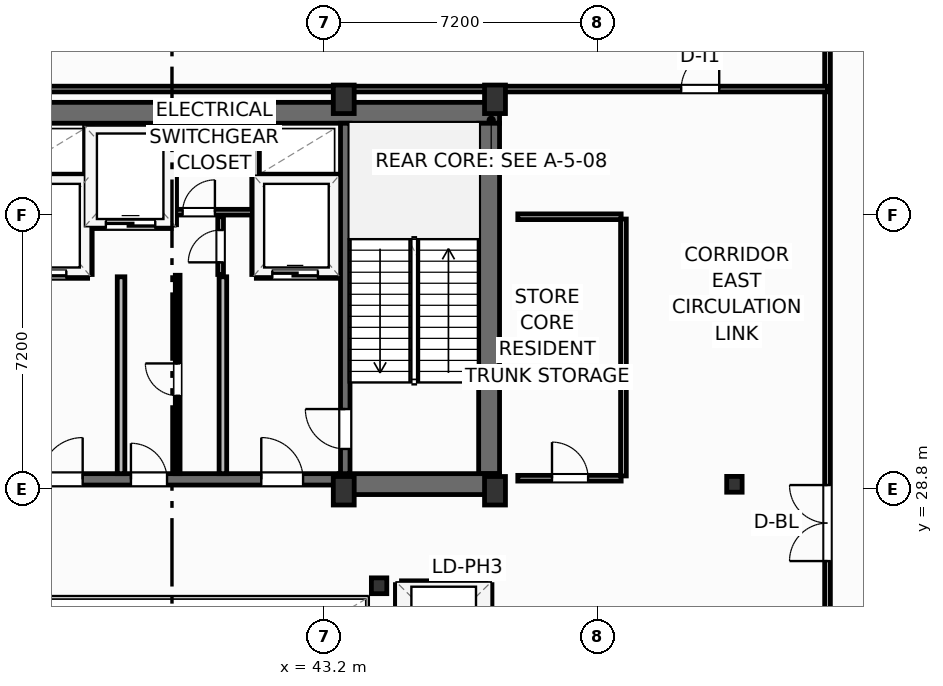
"""IFC4 building model, lengths in metres.
Left out: names, types, materials, properties, quantities, classifications, styles, units other than length and angle.
Written with IfcOpenShell. Run it as: python <this file> out.ifc"""

import sys

from ifc_helpers import new_model, si_unit, direction, frame, frame_2d, origin, origin_2d, place, context, subcontext, project, spatial, rectangle, i_section, extrude, element, fill, save


model = new_model("IFC4")
c1 = context("Model", 3, precision=1e-05, world=origin(), true_north=direction((0.0, 1.0)))
c2 = subcontext(c1, "Body", "Model", "MODEL_VIEW")
j1 = project(units=[si_unit("LENGTHUNIT", "METRE"), si_unit("PLANEANGLEUNIT", "RADIAN")], contexts=[c1])
p1 = place(None, origin())
s1 = spatial("IfcSite", under=j1, at=p1, CompositionType="ELEMENT")
p2 = place(p1, origin())
s2 = spatial("IfcBuilding", under=s1, at=p2, CompositionType="ELEMENT")
p3 = place(p2, frame((0.0, 0.0, 291.5)))
s3 = spatial("IfcBuildingStorey", under=s2, at=p3, CompositionType="ELEMENT", Elevation=291.5)
for number, where, z_axis, x_axis in (
    (1, (43.72, 28.75, 0.0), (0.0, 0.0, 1.0), (1.0, 0.0, 0.0)),
    (2, (47.7, 28.75, 0.0), (0.0, 0.0, 1.0), (1.0, 0.0, 0.0)),
    (3, (43.72, 39.05, 0.0), (0.0, 0.0, 1.0), (1.0, 0.0, 0.0)),
    (4, (47.7, 39.05, 0.0), (0.0, 0.0, 1.0), (1.0, 0.0, 0.0)),
):
    element("IfcColumn", number, at=place(p3, frame(where, z_axis=z_axis, x_axis=x_axis)), inside=s3, PredefinedType="COLUMN", context=c2, shape_type="SweptSolid", body=[
        extrude(rectangle(XDim=0.55, YDim=0.75, at=origin_2d()), origin(), (0.0, 0.0, 1.0), 4.8),
    ])
for number, where, z_axis, x_axis in (
    (5, (44.65, 26.25, 0.0), (0.0, 0.0, 1.0), (1.0, 0.0, 0.0)),
    (6, (54.0, 28.92, 0.0), (0.0, 0.0, 1.0), (1.0, 0.0, 0.0)),
):
    element("IfcColumn", number, at=place(p3, frame(where, z_axis=z_axis, x_axis=x_axis)), inside=s3, PredefinedType="COLUMN", context=c2, shape_type="SweptSolid", body=[
        extrude(i_section(OverallWidth=0.406, OverallDepth=0.416, WebThickness=0.03, FlangeThickness=0.048, FilletRadius=0.025, at=origin_2d()), origin(), (0.0, 0.0, 1.0), 4.8),
    ])
p4 = place(p3, frame((30.58, 38.695, 0.0), z_axis=(0.0, 0.0, 1.0), x_axis=(1.0, 0.0, 0.0)))
e7 = element("IfcWall", 7, at=p4, inside=s3, PredefinedType="SHEAR", context=c2, shape_type="SweptSolid", body=[
    extrude(rectangle(XDim=17.24, YDim=0.55, at=frame_2d((8.62, 0.0))), origin(), (0.0, 0.0, 1.0), 4.48),
])
p5 = place(p3, frame((47.545, 29.2, 0.0), z_axis=(0.0, 0.0, 1.0), x_axis=(0.0, 1.0, 0.0)))
e8 = element("IfcWall", 8, at=p5, inside=s3, PredefinedType="SHEAR", context=c2, shape_type="SweptSolid", body=[
    extrude(rectangle(XDim=9.22, YDim=0.55, at=frame_2d((4.61, 0.0))), origin(), (0.0, 0.0, 1.0), 4.48),
])
p6 = place(p3, frame((43.6, 28.925, 0.0), z_axis=(0.0, 0.0, 1.0), x_axis=(1.0, 0.0, 0.0)))
e9 = element("IfcWall", 9, at=p6, inside=s3, PredefinedType="SHEAR", context=c2, shape_type="SweptSolid", body=[
    extrude(rectangle(XDim=4.22, YDim=0.55, at=frame_2d((2.11, 0.0))), origin(), (0.0, 0.0, 1.0), 4.48),
])
p7 = place(p3, frame((34.8, 29.05, 0.0), z_axis=(0.0, 0.0, 1.0), x_axis=(1.0, 0.0, 0.0)))
e10 = element("IfcWall", 10, at=p7, inside=s3, PredefinedType="SHEAR", context=c2, shape_type="SweptSolid", body=[
    extrude(rectangle(XDim=8.8, YDim=0.3, at=frame_2d((4.4, 0.0))), origin(), (0.0, 0.0, 1.0), 4.48),
])
p8 = place(p7, frame((0.95, 0.0, 0.0)))
e11 = element("IfcOpeningElement", 11, at=p8, cuts=e10, PredefinedType="OPENING", context=c2, shape_type="SweptSolid", body=[
    extrude(rectangle(XDim=1.1, YDim=2.15, at=frame_2d((0.55, 1.075))), frame((0.0, 0.16, 0.0), z_axis=(0.0, -1.0, 0.0), x_axis=(1.0, 0.0, 0.0)), (0.0, 0.0, 1.0), 0.32),
])
p9 = place(p7, frame((6.75, 0.0, 0.0)))
e12 = element("IfcOpeningElement", 12, at=p9, cuts=e10, PredefinedType="OPENING", context=c2, shape_type="SweptSolid", body=[
    extrude(rectangle(XDim=1.1, YDim=2.15, at=frame_2d((0.55, 1.075))), frame((0.0, 0.16, 0.0), z_axis=(0.0, -1.0, 0.0), x_axis=(1.0, 0.0, 0.0)), (0.0, 0.0, 1.0), 0.32),
])
p10 = place(p7, frame((3.32, 0.0, 0.0)))
e13 = element("IfcOpeningElement", 13, at=p10, cuts=e10, PredefinedType="OPENING", context=c2, shape_type="SweptSolid", body=[
    extrude(rectangle(XDim=0.95, YDim=2.15, at=frame_2d((0.475, 1.075))), frame((0.0, 0.16, 0.0), z_axis=(0.0, -1.0, 0.0), x_axis=(1.0, 0.0, 0.0)), (0.0, 0.0, 1.0), 0.32),
])
p11 = place(p3, frame((43.76, 29.2, 0.0), z_axis=(0.0, 0.0, 1.0), x_axis=(0.0, 1.0, 0.0)))
e14 = element("IfcWall", 14, at=p11, inside=s3, PredefinedType="SHEAR", context=c2, shape_type="SweptSolid", body=[
    extrude(rectangle(XDim=9.22, YDim=0.25, at=frame_2d((4.61, 0.0))), origin(), (0.0, 0.0, 1.0), 4.48),
])
p12 = place(p11, frame((0.65, 0.0, 0.0)))
e15 = element("IfcOpeningElement", 15, at=p12, cuts=e14, PredefinedType="OPENING", context=c2, shape_type="SweptSolid", body=[
    extrude(rectangle(XDim=1.05, YDim=2.15, at=frame_2d((0.525, 1.075))), frame((0.0, 0.135, 0.0), z_axis=(0.0, -1.0, 0.0), x_axis=(1.0, 0.0, 0.0)), (0.0, 0.0, 1.0), 0.27),
])
p13 = place(p3, frame((27.693, -7.489, 0.0), z_axis=(0.0, 0.0, 1.0), x_axis=(0.733009701217, 0.680218184057, 0.0)))
e16 = element("IfcWall", 16, at=p13, inside=s3, PredefinedType="SOLIDWALL", context=c2, shape_type="SweptSolid", body=[
    extrude(rectangle(XDim=66.428, YDim=0.22, at=frame_2d((33.214, 0.0))), origin(), (0.0, 0.0, 1.0), 2.265),
])
p14 = place(p13, frame((32.014, 0.0, 0.8)))
e17 = element("IfcOpeningElement", 17, at=p14, cuts=e16, PredefinedType="OPENING", context=c2, shape_type="SweptSolid", body=[
    extrude(rectangle(XDim=2.4, YDim=1.385, at=frame_2d((1.2, 0.692))), frame((0.0, 0.12, 0.0), z_axis=(0.0, -1.0, 0.0), x_axis=(1.0, 0.0, 0.0)), (0.0, 0.0, 1.0), 0.24),
])
p15 = place(p3, frame((50.695, 58.086, 0.0), z_axis=(0.0, 0.0, 1.0), x_axis=(-0.823531024939, -0.567271232272, 0.0)))
e18 = element("IfcWall", 18, at=p15, inside=s3, PredefinedType="SOLIDWALL", context=c2, shape_type="SweptSolid", body=[
    extrude(rectangle(XDim=56.157, YDim=0.22, at=frame_2d((28.079, 0.0))), origin(), (0.0, 0.0, 1.0), 3.76),
])
p16 = place(p15, frame((26.879, 0.0, 0.8)))
e19 = element("IfcOpeningElement", 19, at=p16, cuts=e18, PredefinedType="OPENING", context=c2, shape_type="SweptSolid", body=[
    extrude(rectangle(XDim=2.4, YDim=1.85, at=frame_2d((1.2, 0.925))), frame((0.0, 0.12, 0.0), z_axis=(0.0, -1.0, 0.0), x_axis=(1.0, 0.0, 0.0)), (0.0, 0.0, 1.0), 0.24),
])
p17 = place(p3, frame((56.45, 19.3, 0.0), z_axis=(0.0, 0.0, 1.0), x_axis=(0.0, 1.0, 0.0)))
e20 = element("IfcWall", 20, at=p17, inside=s3, PredefinedType="PARTITIONING", context=c2, shape_type="SweptSolid", body=[
    extrude(rectangle(XDim=32.7, YDim=0.15, at=frame_2d((16.35, 0.0))), origin(), (0.0, 0.0, 1.0), 2.265),
])
p18 = place(p17, frame((7.6, 0.0, 0.0)))
e21 = element("IfcOpeningElement", 21, at=p18, cuts=e20, PredefinedType="OPENING", context=c2, shape_type="SweptSolid", body=[
    extrude(rectangle(XDim=2.0, YDim=2.05, at=frame_2d((1.0, 1.025))), frame((0.0, 0.085, 0.0), z_axis=(0.0, -1.0, 0.0), x_axis=(1.0, 0.0, 0.0)), (0.0, 0.0, 1.0), 0.17),
])
p19 = place(p3, frame((28.0, 39.32, 0.0), z_axis=(0.0, 0.0, 1.0), x_axis=(1.0, 0.0, 0.0)))
e22 = element("IfcWall", 22, at=p19, inside=s3, PredefinedType="PARTITIONING", context=c2, shape_type="SweptSolid", body=[
    extrude(rectangle(XDim=28.45, YDim=0.15, at=frame_2d((14.225, 0.0))), origin(), (0.0, 0.0, 1.0), 4.48),
])
p20 = place(p19, frame((24.6, 0.0, 0.0)))
e23 = element("IfcOpeningElement", 23, at=p20, cuts=e22, PredefinedType="OPENING", context=c2, shape_type="SweptSolid", body=[
    extrude(rectangle(XDim=1.0, YDim=2.05, at=frame_2d((0.5, 1.025))), frame((0.0, 0.085, 0.0), z_axis=(0.0, -1.0, 0.0), x_axis=(1.0, 0.0, 0.0)), (0.0, 0.0, 1.0), 0.17),
])
for number, where, z_axis, x_axis in (
    (24, (37.86, 29.2, 0.0), (0.0, 0.0, 1.0), (0.0, 1.0, 0.0)),
    (25, (40.54, 29.2, 0.0), (0.0, 0.0, 1.0), (0.0, 1.0, 0.0)),
):
    element("IfcWall", number, at=place(p3, frame(where, z_axis=z_axis, x_axis=x_axis)), inside=s3, PredefinedType="PARTITIONING", context=c2, shape_type="SweptSolid", body=[
        extrude(rectangle(XDim=5.18, YDim=0.2, at=frame_2d((2.59, 0.0))), origin(), (0.0, 0.0, 1.0), 4.48),
    ])
p21 = place(p3, frame((34.8, 34.44, 0.0), z_axis=(0.0, 0.0, 1.0), x_axis=(1.0, 0.0, 0.0)))
e26 = element("IfcWall", 26, at=p21, inside=s3, PredefinedType="PARTITIONING", context=c2, shape_type="SweptSolid", body=[
    extrude(rectangle(XDim=2.18, YDim=0.2, at=frame_2d((1.09, 0.0))), origin(), (0.0, 0.0, 1.0), 4.48),
])
p22 = place(p21, frame((0.42, 0.0, 0.0)))
e27 = element("IfcOpeningElement", 27, at=p22, cuts=e26, PredefinedType="OPENING", context=c2, shape_type="SweptSolid", body=[
    extrude(rectangle(XDim=1.2, YDim=2.2, at=frame_2d((0.6, 1.1))), frame((0.0, 0.11, 0.0), z_axis=(0.0, -1.0, 0.0), x_axis=(1.0, 0.0, 0.0)), (0.0, 0.0, 1.0), 0.22),
])
p23 = place(p3, frame((34.8, 36.98, 0.0), z_axis=(0.0, 0.0, 1.0), x_axis=(1.0, 0.0, 0.0)))
e28 = element("IfcWall", 28, at=p23, inside=s3, PredefinedType="PARTITIONING", context=c2, shape_type="SweptSolid", body=[
    extrude(rectangle(XDim=2.18, YDim=0.2, at=frame_2d((1.09, 0.0))), origin(), (0.0, 0.0, 1.0), 4.48),
])
p24 = place(p3, frame((37.0, 34.44, 0.0), z_axis=(0.0, 0.0, 1.0), x_axis=(0.0, 1.0, 0.0)))
e29 = element("IfcWall", 29, at=p24, inside=s3, PredefinedType="PARTITIONING", context=c2, shape_type="SweptSolid", body=[
    extrude(rectangle(XDim=3.9, YDim=0.2, at=frame_2d((1.95, 0.0))), origin(), (0.0, 0.0, 1.0), 4.48),
])
p25 = place(p3, frame((41.42, 34.44, 0.0), z_axis=(0.0, 0.0, 1.0), x_axis=(1.0, 0.0, 0.0)))
e30 = element("IfcWall", 30, at=p25, inside=s3, PredefinedType="PARTITIONING", context=c2, shape_type="SweptSolid", body=[
    extrude(rectangle(XDim=2.18, YDim=0.2, at=frame_2d((1.09, 0.0))), origin(), (0.0, 0.0, 1.0), 4.48),
])
p26 = place(p25, frame((0.42, 0.0, 0.0)))
e31 = element("IfcOpeningElement", 31, at=p26, cuts=e30, PredefinedType="OPENING", context=c2, shape_type="SweptSolid", body=[
    extrude(rectangle(XDim=1.2, YDim=2.2, at=frame_2d((0.6, 1.1))), frame((0.0, 0.11, 0.0), z_axis=(0.0, -1.0, 0.0), x_axis=(1.0, 0.0, 0.0)), (0.0, 0.0, 1.0), 0.22),
])
p27 = place(p3, frame((41.42, 36.98, 0.0), z_axis=(0.0, 0.0, 1.0), x_axis=(1.0, 0.0, 0.0)))
e32 = element("IfcWall", 32, at=p27, inside=s3, PredefinedType="PARTITIONING", context=c2, shape_type="SweptSolid", body=[
    extrude(rectangle(XDim=2.18, YDim=0.2, at=frame_2d((1.09, 0.0))), origin(), (0.0, 0.0, 1.0), 4.48),
])
p28 = place(p3, frame((41.4, 34.44, 0.0), z_axis=(0.0, 0.0, 1.0), x_axis=(0.0, 1.0, 0.0)))
e33 = element("IfcWall", 33, at=p28, inside=s3, PredefinedType="PARTITIONING", context=c2, shape_type="SweptSolid", body=[
    extrude(rectangle(XDim=3.9, YDim=0.2, at=frame_2d((1.95, 0.0))), origin(), (0.0, 0.0, 1.0), 4.48),
])
p29 = place(p3, frame((37.06, 35.75, 0.0), z_axis=(0.0, 0.0, 1.0), x_axis=(1.0, 0.0, 0.0)))
e34 = element("IfcWall", 34, at=p29, inside=s3, PredefinedType="PARTITIONING", context=c2, shape_type="SweptSolid", body=[
    extrude(rectangle(XDim=2.12, YDim=0.2, at=frame_2d((1.06, 0.0))), origin(), (0.0, 0.0, 1.0), 4.48),
])
p30 = place(p29, frame((0.4, 0.0, 0.0)))
e35 = element("IfcOpeningElement", 35, at=p30, cuts=e34, PredefinedType="OPENING", context=c2, shape_type="SweptSolid", body=[
    extrude(rectangle(XDim=1.3, YDim=2.2, at=frame_2d((0.65, 1.1))), frame((0.0, 0.11, 0.0), z_axis=(0.0, -1.0, 0.0), x_axis=(1.0, 0.0, 0.0)), (0.0, 0.0, 1.0), 0.22),
])
p31 = place(p3, frame((39.22, 35.75, 0.0), z_axis=(0.0, 0.0, 1.0), x_axis=(0.0, 1.0, 0.0)))
e36 = element("IfcWall", 36, at=p31, inside=s3, PredefinedType="PARTITIONING", context=c2, shape_type="SweptSolid", body=[
    extrude(rectangle(XDim=2.59, YDim=0.2, at=frame_2d((1.295, 0.0))), origin(), (0.0, 0.0, 1.0), 4.48),
])
p32 = place(p3, frame((39.3, 36.08, 0.0), z_axis=(0.0, 0.0, 1.0), x_axis=(1.0, 0.0, 0.0)))
e37 = element("IfcWall", 37, at=p32, inside=s3, PredefinedType="PARTITIONING", context=c2, shape_type="SweptSolid", body=[
    extrude(rectangle(XDim=2.02, YDim=0.15, at=frame_2d((1.01, 0.0))), origin(), (0.0, 0.0, 1.0), 4.48),
])
p33 = place(p32, frame((0.18, 0.0, 0.0)))
e38 = element("IfcOpeningElement", 38, at=p33, cuts=e37, PredefinedType="OPENING", context=c2, shape_type="SweptSolid", body=[
    extrude(rectangle(XDim=0.85, YDim=2.05, at=frame_2d((0.425, 1.025))), frame((0.0, 0.085, 0.0), z_axis=(0.0, -1.0, 0.0), x_axis=(1.0, 0.0, 0.0)), (0.0, 0.0, 1.0), 0.17),
])
p34 = place(p3, frame((40.48, 34.44, 0.0), z_axis=(0.0, 0.0, 1.0), x_axis=(0.0, 1.0, 0.0)))
e39 = element("IfcWall", 39, at=p34, inside=s3, PredefinedType="PARTITIONING", context=c2, shape_type="SweptSolid", body=[
    extrude(rectangle(XDim=1.52, YDim=0.15, at=frame_2d((0.76, 0.0))), origin(), (0.0, 0.0, 1.0), 4.48),
])
p35 = place(p34, frame((0.32, 0.0, 0.0)))
e40 = element("IfcOpeningElement", 40, at=p35, cuts=e39, PredefinedType="OPENING", context=c2, shape_type="SweptSolid", body=[
    extrude(rectangle(XDim=0.85, YDim=2.05, at=frame_2d((0.425, 1.025))), frame((0.0, 0.085, 0.0), z_axis=(0.0, -1.0, 0.0), x_axis=(1.0, 0.0, 0.0)), (0.0, 0.0, 1.0), 0.17),
])
p36 = place(p3, frame((39.35, 29.2, 0.0), z_axis=(0.0, 0.0, 1.0), x_axis=(0.0, 1.0, 0.0)))
e41 = element("IfcWall", 41, at=p36, inside=s3, PredefinedType="PARTITIONING", context=c2, shape_type="SweptSolid", body=[
    extrude(rectangle(XDim=5.22, YDim=0.125, at=frame_2d((2.61, 0.0))), origin(), (0.0, 0.0, 1.0), 4.48),
])
p37 = place(p36, frame((2.05, 0.0, 0.0)))
e42 = element("IfcOpeningElement", 42, at=p37, cuts=e41, PredefinedType="OPENING", context=c2, shape_type="SweptSolid", body=[
    extrude(rectangle(XDim=0.85, YDim=2.05, at=frame_2d((0.425, 1.025))), frame((0.0, 0.073, 0.0), z_axis=(0.0, -1.0, 0.0), x_axis=(1.0, 0.0, 0.0)), (0.0, 0.0, 1.0), 0.145),
])
p38 = place(p3, frame((48.3, 29.08, 0.0), z_axis=(0.0, 0.0, 1.0), x_axis=(1.0, 0.0, 0.0)))
e43 = element("IfcWall", 43, at=p38, inside=s3, PredefinedType="PARTITIONING", context=c2, shape_type="SweptSolid", body=[
    extrude(rectangle(XDim=2.72, YDim=0.15, at=frame_2d((1.36, 0.0))), origin(), (0.0, 0.0, 1.0), 3.692),
])
p39 = place(p38, frame((0.9, 0.0, 0.0)))
e44 = element("IfcOpeningElement", 44, at=p39, cuts=e43, PredefinedType="OPENING", context=c2, shape_type="SweptSolid", body=[
    extrude(rectangle(XDim=0.95, YDim=2.05, at=frame_2d((0.475, 1.025))), frame((0.0, 0.085, 0.0), z_axis=(0.0, -1.0, 0.0), x_axis=(1.0, 0.0, 0.0)), (0.0, 0.0, 1.0), 0.17),
])
p40 = place(p3, frame((48.3, 35.96, 0.0), z_axis=(0.0, 0.0, 1.0), x_axis=(1.0, 0.0, 0.0)))
e45 = element("IfcWall", 45, at=p40, inside=s3, PredefinedType="PARTITIONING", context=c2, shape_type="SweptSolid", body=[
    extrude(rectangle(XDim=2.72, YDim=0.15, at=frame_2d((1.36, 0.0))), origin(), (0.0, 0.0, 1.0), 4.48),
])
p41 = place(p3, frame((51.08, 29.14, 0.0), z_axis=(0.0, 0.0, 1.0), x_axis=(0.0, 1.0, 0.0)))
e46 = element("IfcWall", 46, at=p41, inside=s3, PredefinedType="PARTITIONING", context=c2, shape_type="SweptSolid", body=[
    extrude(rectangle(XDim=6.76, YDim=0.15, at=frame_2d((3.38, 0.0))), origin(), (0.0, 0.0, 1.0), 4.48),
])
p42 = place(p3, frame((45.24, 26.28, 0.0), z_axis=(0.0, 0.0, 1.0), x_axis=(1.0, 0.0, 0.0)))
e47 = element("IfcWall", 47, at=p42, inside=s3, PredefinedType="PARTITIONING", context=c2, shape_type="SweptSolid", body=[
    extrude(rectangle(XDim=2.22, YDim=0.2, at=frame_2d((1.11, 0.0))), origin(), (0.0, 0.0, 1.0), 4.48),
])
p43 = place(p3, frame((45.18, 19.38, 0.0), z_axis=(0.0, 0.0, 1.0), x_axis=(0.0, 1.0, 0.0)))
e48 = element("IfcWall", 48, at=p43, inside=s3, PredefinedType="PARTITIONING", context=c2, shape_type="SweptSolid", body=[
    extrude(rectangle(XDim=6.9, YDim=0.2, at=frame_2d((3.45, 0.0))), origin(), (0.0, 0.0, 1.0), 4.48),
])
p44 = place(p3, frame((47.52, 19.38, 0.0), z_axis=(0.0, 0.0, 1.0), x_axis=(0.0, 1.0, 0.0)))
e49 = element("IfcWall", 49, at=p44, inside=s3, PredefinedType="PARTITIONING", context=c2, shape_type="SweptSolid", body=[
    extrude(rectangle(XDim=6.9, YDim=0.2, at=frame_2d((3.45, 0.0))), origin(), (0.0, 0.0, 1.0), 4.48),
])
p45 = place(p44, frame((0.59, 0.0, 0.0)))
e50 = element("IfcOpeningElement", 50, at=p45, cuts=e49, PredefinedType="OPENING", context=c2, shape_type="SweptSolid", body=[
    extrude(rectangle(XDim=1.1, YDim=2.15, at=frame_2d((0.55, 1.075))), frame((0.0, 0.11, 0.0), z_axis=(0.0, -1.0, 0.0), x_axis=(1.0, 0.0, 0.0)), (0.0, 0.0, 1.0), 0.22),
])
p46 = place(p44, frame((2.89, 0.0, 0.0)))
e51 = element("IfcOpeningElement", 51, at=p46, cuts=e49, PredefinedType="OPENING", context=c2, shape_type="SweptSolid", body=[
    extrude(rectangle(XDim=1.1, YDim=2.15, at=frame_2d((0.55, 1.075))), frame((0.0, 0.11, 0.0), z_axis=(0.0, -1.0, 0.0), x_axis=(1.0, 0.0, 0.0)), (0.0, 0.0, 1.0), 0.22),
])
p47 = place(p44, frame((5.19, 0.0, 0.0)))
e52 = element("IfcOpeningElement", 52, at=p47, cuts=e49, PredefinedType="OPENING", context=c2, shape_type="SweptSolid", body=[
    extrude(rectangle(XDim=1.1, YDim=2.15, at=frame_2d((0.55, 1.075))), frame((0.0, 0.11, 0.0), z_axis=(0.0, -1.0, 0.0), x_axis=(1.0, 0.0, 0.0)), (0.0, 0.0, 1.0), 0.22),
])
p48 = place(p18, origin())
e53 = element("IfcDoor", 53, at=p48, inside=s3, OperationType="DOUBLE_DOOR_SINGLE_SWING", PredefinedType="DOOR", context=c2, shape_type="SweptSolid", body=[
    extrude(rectangle(XDim=2.0, YDim=2.05, at=frame_2d((1.0, 1.025))), frame((0.0, 0.025, 0.0), z_axis=(0.0, -1.0, 0.0), x_axis=(1.0, 0.0, 0.0)), (0.0, 0.0, 1.0), 0.05),
])
fill(e21, e53)
p49 = place(p20, origin())
e54 = element("IfcDoor", 54, at=p49, inside=s3, OperationType="SINGLE_SWING_RIGHT", PredefinedType="DOOR", context=c2, shape_type="SweptSolid", body=[
    extrude(rectangle(XDim=1.0, YDim=2.05, at=frame_2d((0.5, 1.025))), frame((0.0, 0.025, 0.0), z_axis=(0.0, -1.0, 0.0), x_axis=(1.0, 0.0, 0.0)), (0.0, 0.0, 1.0), 0.05),
])
fill(e23, e54)
p50 = place(p12, origin())
e55 = element("IfcDoor", 55, at=p50, inside=s3, OperationType="SINGLE_SWING_RIGHT", PredefinedType="DOOR", context=c2, shape_type="SweptSolid", body=[
    extrude(rectangle(XDim=1.05, YDim=2.15, at=frame_2d((0.525, 1.075))), frame((0.0, 0.025, 0.0), z_axis=(0.0, -1.0, 0.0), x_axis=(1.0, 0.0, 0.0)), (0.0, 0.0, 1.0), 0.05),
])
fill(e15, e55)
p51 = place(p8, origin())
e56 = element("IfcDoor", 56, at=p51, inside=s3, OperationType="SINGLE_SWING_RIGHT", PredefinedType="DOOR", context=c2, shape_type="SweptSolid", body=[
    extrude(rectangle(XDim=1.1, YDim=2.15, at=frame_2d((0.55, 1.075))), frame((0.0, 0.025, 0.0), z_axis=(0.0, -1.0, 0.0), x_axis=(1.0, 0.0, 0.0)), (0.0, 0.0, 1.0), 0.05),
])
fill(e11, e56)
p52 = place(p9, origin())
e57 = element("IfcDoor", 57, at=p52, inside=s3, OperationType="SINGLE_SWING_LEFT", PredefinedType="DOOR", context=c2, shape_type="SweptSolid", body=[
    extrude(rectangle(XDim=1.1, YDim=2.15, at=frame_2d((0.55, 1.075))), frame((0.0, 0.025, 0.0), z_axis=(0.0, -1.0, 0.0), x_axis=(1.0, 0.0, 0.0)), (0.0, 0.0, 1.0), 0.05),
])
fill(e12, e57)
p53 = place(p22, origin())
e58 = element("IfcDoor", 58, at=p53, inside=s3, OperationType="SLIDING_TO_LEFT", PredefinedType="DOOR", context=c2, shape_type="SweptSolid", body=[
    extrude(rectangle(XDim=1.2, YDim=2.2, at=frame_2d((0.6, 1.1))), frame((0.0, 0.025, 0.0), z_axis=(0.0, -1.0, 0.0), x_axis=(1.0, 0.0, 0.0)), (0.0, 0.0, 1.0), 0.05),
])
fill(e27, e58)
p54 = place(p26, origin())
e59 = element("IfcDoor", 59, at=p54, inside=s3, OperationType="SLIDING_TO_LEFT", PredefinedType="DOOR", context=c2, shape_type="SweptSolid", body=[
    extrude(rectangle(XDim=1.2, YDim=2.2, at=frame_2d((0.6, 1.1))), frame((0.0, 0.025, 0.0), z_axis=(0.0, -1.0, 0.0), x_axis=(1.0, 0.0, 0.0)), (0.0, 0.0, 1.0), 0.05),
])
fill(e31, e59)
p55 = place(p30, origin())
e60 = element("IfcDoor", 60, at=p55, inside=s3, OperationType="SLIDING_TO_LEFT", PredefinedType="DOOR", context=c2, shape_type="SweptSolid", body=[
    extrude(rectangle(XDim=1.3, YDim=2.2, at=frame_2d((0.65, 1.1))), frame((0.0, 0.025, 0.0), z_axis=(0.0, -1.0, 0.0), x_axis=(1.0, 0.0, 0.0)), (0.0, 0.0, 1.0), 0.05),
])
fill(e35, e60)
p56 = place(p33, origin())
e61 = element("IfcDoor", 61, at=p56, inside=s3, OperationType="SINGLE_SWING_RIGHT", PredefinedType="DOOR", context=c2, shape_type="SweptSolid", body=[
    extrude(rectangle(XDim=0.85, YDim=2.05, at=frame_2d((0.425, 1.025))), frame((0.0, 0.025, 0.0), z_axis=(0.0, -1.0, 0.0), x_axis=(1.0, 0.0, 0.0)), (0.0, 0.0, 1.0), 0.05),
])
fill(e38, e61)
p57 = place(p35, origin())
e62 = element("IfcDoor", 62, at=p57, inside=s3, OperationType="SINGLE_SWING_LEFT", PredefinedType="DOOR", context=c2, shape_type="SweptSolid", body=[
    extrude(rectangle(XDim=0.85, YDim=2.05, at=frame_2d((0.425, 1.025))), frame((0.0, 0.025, 0.0), z_axis=(0.0, -1.0, 0.0), x_axis=(1.0, 0.0, 0.0)), (0.0, 0.0, 1.0), 0.05),
])
fill(e40, e62)
p58 = place(p37, origin())
e63 = element("IfcDoor", 63, at=p58, inside=s3, OperationType="SINGLE_SWING_RIGHT", PredefinedType="DOOR", context=c2, shape_type="SweptSolid", body=[
    extrude(rectangle(XDim=0.85, YDim=2.05, at=frame_2d((0.425, 1.025))), frame((0.0, 0.025, 0.0), z_axis=(0.0, -1.0, 0.0), x_axis=(1.0, 0.0, 0.0)), (0.0, 0.0, 1.0), 0.05),
])
fill(e42, e63)
p59 = place(p10, origin())
e64 = element("IfcDoor", 64, at=p59, inside=s3, OperationType="SINGLE_SWING_LEFT", PredefinedType="DOOR", context=c2, shape_type="SweptSolid", body=[
    extrude(rectangle(XDim=0.95, YDim=2.15, at=frame_2d((0.475, 1.075))), frame((0.0, 0.025, 0.0), z_axis=(0.0, -1.0, 0.0), x_axis=(1.0, 0.0, 0.0)), (0.0, 0.0, 1.0), 0.05),
])
fill(e13, e64)
p60 = place(p39, origin())
e65 = element("IfcDoor", 65, at=p60, inside=s3, OperationType="SINGLE_SWING_LEFT", PredefinedType="DOOR", context=c2, shape_type="SweptSolid", body=[
    extrude(rectangle(XDim=0.95, YDim=2.05, at=frame_2d((0.475, 1.025))), frame((0.0, 0.025, 0.0), z_axis=(0.0, -1.0, 0.0), x_axis=(1.0, 0.0, 0.0)), (0.0, 0.0, 1.0), 0.05),
])
fill(e44, e65)
save(model, sys.argv[1])
